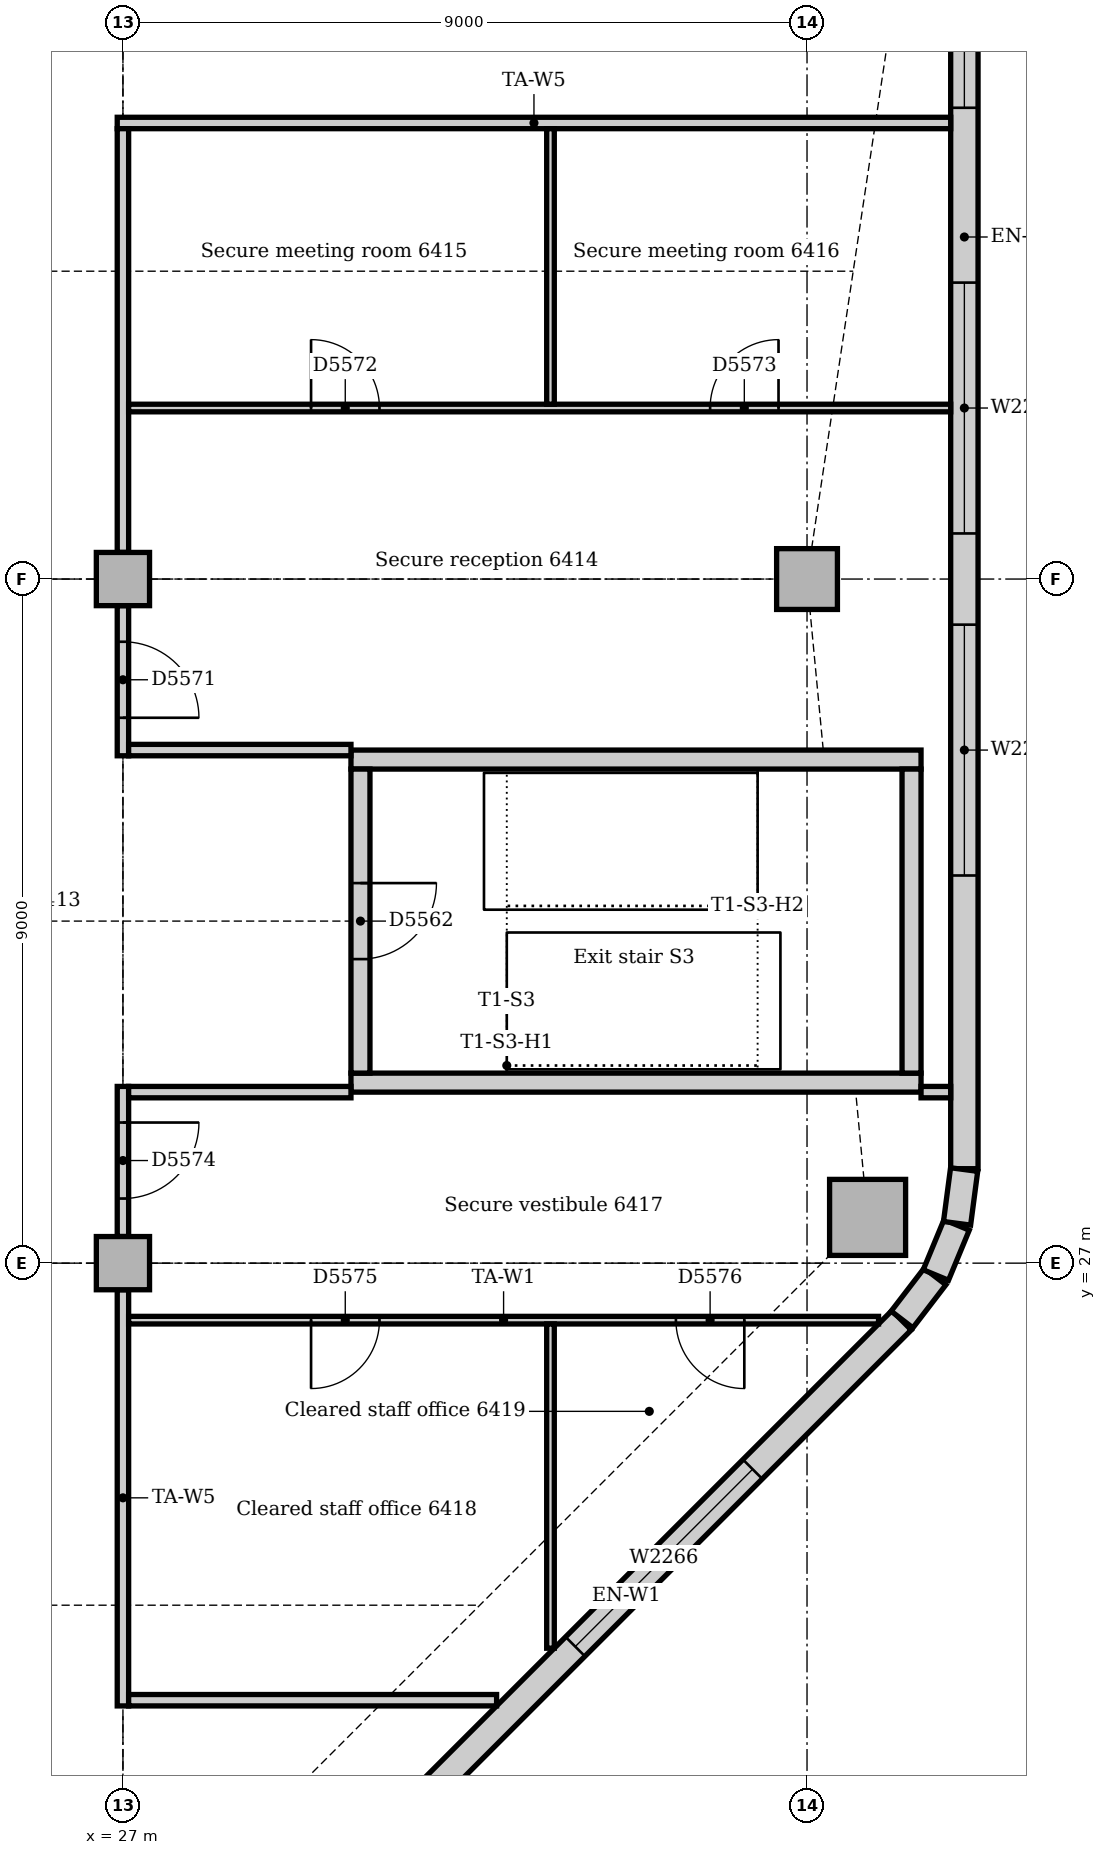
"""IFC4 building model, lengths in metres.
Left out: names, types, materials, properties, quantities, classifications, styles, units other than length and angle.
Written with IfcOpenShell. Run it as: python <this file> out.ifc"""

import sys

from ifc_helpers import new_model, si_unit, direction, frame, frame_2d, origin, origin_2d, place, context, subcontext, project, spatial, rectangle, extrude, element, fill, save


model = new_model("IFC4")
c1 = context("Model", 3, precision=1e-05, world=origin(), true_north=direction((0.0, 1.0)))
c2 = subcontext(c1, "Body", "Model", "MODEL_VIEW")
j1 = project(units=[si_unit("LENGTHUNIT", "METRE"), si_unit("PLANEANGLEUNIT", "RADIAN")], contexts=[c1])
p1 = place(None, origin())
s1 = spatial("IfcSite", under=j1, at=p1, CompositionType="ELEMENT")
p2 = place(p1, origin())
s2 = spatial("IfcBuilding", under=s1, at=p2, CompositionType="ELEMENT")
p3 = place(p2, frame((0.0, 0.0, 267.0)))
s3 = spatial("IfcBuildingStorey", under=s2, at=p3, CompositionType="ELEMENT", Elevation=267.0)
for number, where, z_axis, x_axis in (
    (1, (30.0, 29.375, 0.0), (0.0, 0.0, 1.0), (1.0, 0.0, 0.0)),
    (2, (37.5, 33.625, 0.0), (0.0, 0.0, 1.0), (-1.0, 0.0, 0.0)),
):
    element("IfcWall", number, at=place(p3, frame(where, z_axis=z_axis, x_axis=x_axis)), inside=s3, PredefinedType="SOLIDWALL", context=c2, shape_type="SweptSolid", body=[
        extrude(rectangle(XDim=7.5, YDim=0.25, at=frame_2d((3.75, 0.0))), origin(), (0.0, 0.0, 1.0), 4.0),
    ])
p4 = place(p3, frame((37.375, 29.5, 0.0), z_axis=(0.0, 0.0, 1.0), x_axis=(0.0, 1.0, 0.0)))
e3 = element("IfcWall", 3, at=p4, inside=s3, PredefinedType="SOLIDWALL", context=c2, shape_type="SweptSolid", body=[
    extrude(rectangle(XDim=4.0, YDim=0.25, at=frame_2d((2.0, 0.0))), origin(), (0.0, 0.0, 1.0), 4.0),
])
p5 = place(p3, frame((30.125, 33.5, 0.0), z_axis=(0.0, 0.0, 1.0), x_axis=(0.0, -1.0, 0.0)))
e4 = element("IfcWall", 4, at=p5, inside=s3, PredefinedType="SOLIDWALL", context=c2, shape_type="SweptSolid", body=[
    extrude(rectangle(XDim=4.0, YDim=0.25, at=frame_2d((2.0, 0.0))), origin(), (0.0, 0.0, 1.0), 4.0),
])
p6 = place(p5, frame((1.5, 0.0, 0.0)))
e5 = element("IfcOpeningElement", 5, at=p6, cuts=e4, PredefinedType="OPENING", context=c2, shape_type="SweptSolid", body=[
    extrude(rectangle(XDim=1.0, YDim=2.1, at=frame_2d((0.5, 1.05))), frame((0.0, 0.135, 0.0), z_axis=(0.0, -1.0, 0.0), x_axis=(1.0, 0.0, 0.0)), (0.0, 0.0, 1.0), 0.27),
])
p7 = place(p3, frame((36.797, 27.602, 0.0), z_axis=(0.0, 0.0, 1.0), x_axis=(1.0, 0.0, 0.0)))
e6 = element("IfcColumn", 6, at=p7, inside=s3, PredefinedType="COLUMN", context=c2, shape_type="SweptSolid", body=[
    extrude(rectangle(XDim=1.0, YDim=1.0, at=origin_2d()), origin(), (0.0, 0.0, 1.0), 3.85),
])
p8 = place(p3, frame((36.0, 36.0, 0.0), z_axis=(0.0, 0.0, 1.0), x_axis=(1.0, 0.0, 0.0)))
e7 = element("IfcColumn", 7, at=p8, inside=s3, PredefinedType="COLUMN", context=c2, shape_type="SweptSolid", body=[
    extrude(rectangle(XDim=0.8, YDim=0.8, at=origin_2d()), origin(), (0.0, 0.0, 1.0), 3.85),
])
for number, where, z_axis, x_axis in (
    (8, (27.0, 27.0, 0.0), (0.0, 0.0, 1.0), (1.0, 0.0, 0.0)),
    (9, (27.0, 36.0, 0.0), (0.0, 0.0, 1.0), (1.0, 0.0, 0.0)),
):
    element("IfcColumn", number, at=place(p3, frame(where, z_axis=z_axis, x_axis=x_axis)), inside=s3, PredefinedType="COLUMN", context=c2, shape_type="SweptSolid", body=[
        extrude(rectangle(XDim=0.7, YDim=0.7, at=origin_2d()), origin(), (0.0, 0.0, 1.0), 3.85),
    ])
p9 = place(p3, frame((30.001, 19.006, 0.0), z_axis=(0.0, 0.0, 1.0), x_axis=(0.707106781187, 0.707106781187, 0.0)))
e10 = element("IfcWall", 10, at=p9, inside=s3, PredefinedType="STANDARD", context=c2, shape_type="SweptSolid", body=[
    extrude(rectangle(XDim=10.243, YDim=0.36, at=frame_2d((5.121, 0.0))), origin(), (0.0, 0.0, 1.0), 3.85),
])
p10 = place(p9, frame((4.171, 0.0, 0.9)))
e11 = element("IfcOpeningElement", 11, at=p10, cuts=e10, PredefinedType="OPENING", context=c2, shape_type="SweptSolid", body=[
    extrude(rectangle(XDim=3.3, YDim=1.6, at=frame_2d((1.65, 0.8))), frame((0.0, 0.19, 0.0), z_axis=(0.0, -1.0, 0.0), x_axis=(1.0, 0.0, 0.0)), (0.0, 0.0, 1.0), 0.38),
])
p11 = place(p3, frame((38.07, 28.243, 0.0), z_axis=(0.0, 0.0, 1.0), x_axis=(0.0, 1.0, 0.0)))
e12 = element("IfcWall", 12, at=p11, inside=s3, PredefinedType="STANDARD", context=c2, shape_type="SweptSolid", body=[
    extrude(rectangle(XDim=24.515, YDim=0.36, at=frame_2d((12.257, 0.0))), origin(), (0.0, 0.0, 1.0), 3.85),
])
p12 = place(p11, frame((3.857, 0.0, 0.9)))
e13 = element("IfcOpeningElement", 13, at=p12, cuts=e12, PredefinedType="OPENING", context=c2, shape_type="SweptSolid", body=[
    extrude(rectangle(XDim=3.3, YDim=1.6, at=frame_2d((1.65, 0.8))), frame((0.0, 0.19, 0.0), z_axis=(0.0, -1.0, 0.0), x_axis=(1.0, 0.0, 0.0)), (0.0, 0.0, 1.0), 0.38),
])
p13 = place(p11, frame((8.357, 0.0, 0.9)))
e14 = element("IfcOpeningElement", 14, at=p13, cuts=e12, PredefinedType="OPENING", context=c2, shape_type="SweptSolid", body=[
    extrude(rectangle(XDim=3.3, YDim=1.6, at=frame_2d((1.65, 0.8))), frame((0.0, 0.19, 0.0), z_axis=(0.0, -1.0, 0.0), x_axis=(1.0, 0.0, 0.0)), (0.0, 0.0, 1.0), 0.38),
])
p14 = place(p11, frame((13.957, 0.0, 0.9)))
e15 = element("IfcOpeningElement", 15, at=p14, cuts=e12, PredefinedType="OPENING", context=c2, shape_type="SweptSolid", body=[
    extrude(rectangle(XDim=1.8, YDim=1.6, at=frame_2d((0.9, 0.8))), frame((0.0, 0.19, 0.0), z_axis=(0.0, -1.0, 0.0), x_axis=(1.0, 0.0, 0.0)), (0.0, 0.0, 1.0), 0.38),
])
p15 = place(p11, frame((17.357, 0.0, 0.9)))
e16 = element("IfcOpeningElement", 16, at=p15, cuts=e12, PredefinedType="OPENING", context=c2, shape_type="SweptSolid", body=[
    extrude(rectangle(XDim=3.3, YDim=1.6, at=frame_2d((1.65, 0.8))), frame((0.0, 0.19, 0.0), z_axis=(0.0, -1.0, 0.0), x_axis=(1.0, 0.0, 0.0)), (0.0, 0.0, 1.0), 0.38),
])
p16 = place(p3, frame((37.25, 26.259, 0.0), z_axis=(0.0, 0.0, 1.0), x_axis=(0.608802368033, 0.793321924995, 0.0)))
e17 = element("IfcWall", 17, at=p16, inside=s3, PredefinedType="STANDARD", context=c2, shape_type="SweptSolid", body=[
    extrude(rectangle(XDim=0.713, YDim=0.36, at=frame_2d((0.357, 0.0))), origin(), (0.0, 0.0, 1.0), 3.85),
])
for number, where, z_axis, x_axis in (
    (18, (37.695, 26.844, 0.0), (0.0, 0.0, 1.0), (0.383, 0.924, 0.0)),
    (19, (37.974, 27.524, 0.0), (0.0, 0.0, 1.0), (0.131, 0.991, 0.0)),
):
    element("IfcWall", number, at=place(p3, frame(where, z_axis=z_axis, x_axis=x_axis)), inside=s3, PredefinedType="STANDARD", context=c2, shape_type="SweptSolid", body=[
        extrude(rectangle(XDim=0.713, YDim=0.36, at=frame_2d((0.356, 0.0))), origin(), (0.0, 0.0, 1.0), 3.85),
    ])
p17 = place(p3, frame((26.925, 42.0, 0.0), z_axis=(0.0, 0.0, 1.0), x_axis=(1.0, 0.0, 0.0)))
e20 = element("IfcWall", 20, at=p17, inside=s3, PredefinedType="PARTITIONING", context=c2, shape_type="SweptSolid", body=[
    extrude(rectangle(XDim=10.965, YDim=0.15, at=frame_2d((5.482, 0.0))), origin(), (0.0, 0.0, 1.0), 3.85),
])
p18 = place(p3, frame((27.0, 33.675, 0.0), z_axis=(0.0, 0.0, 1.0), x_axis=(0.0, 1.0, 0.0)))
e21 = element("IfcWall", 21, at=p18, inside=s3, PredefinedType="PARTITIONING", context=c2, shape_type="SweptSolid", body=[
    extrude(rectangle(XDim=1.975, YDim=0.15, at=frame_2d((0.988, 0.0))), origin(), (0.0, 0.0, 1.0), 3.4),
])
p19 = place(p18, frame((0.5, 0.0, 0.0)))
e22 = element("IfcOpeningElement", 22, at=p19, cuts=e21, PredefinedType="OPENING", context=c2, shape_type="SweptSolid", body=[
    extrude(rectangle(XDim=1.0, YDim=2.1, at=frame_2d((0.5, 1.05))), frame((0.0, 0.085, 0.0), z_axis=(0.0, -1.0, 0.0), x_axis=(1.0, 0.0, 0.0)), (0.0, 0.0, 1.0), 0.17),
])
p20 = place(p3, frame((27.0, 36.35, 0.0), z_axis=(0.0, 0.0, 1.0), x_axis=(0.0, 1.0, 0.0)))
e23 = element("IfcWall", 23, at=p20, inside=s3, PredefinedType="PARTITIONING", context=c2, shape_type="SweptSolid", body=[
    extrude(rectangle(XDim=5.575, YDim=0.15, at=frame_2d((2.788, 0.0))), origin(), (0.0, 0.0, 1.0), 3.4),
])
p21 = place(p3, frame((27.0, 21.175, 0.0), z_axis=(0.0, 0.0, 1.0), x_axis=(0.0, 1.0, 0.0)))
e24 = element("IfcWall", 24, at=p21, inside=s3, PredefinedType="PARTITIONING", context=c2, shape_type="SweptSolid", body=[
    extrude(rectangle(XDim=5.475, YDim=0.15, at=frame_2d((2.737, 0.0))), origin(), (0.0, 0.0, 1.0), 3.4),
])
p22 = place(p3, frame((27.0, 27.35, 0.0), z_axis=(0.0, 0.0, 1.0), x_axis=(0.0, 1.0, 0.0)))
e25 = element("IfcWall", 25, at=p22, inside=s3, PredefinedType="PARTITIONING", context=c2, shape_type="SweptSolid", body=[
    extrude(rectangle(XDim=1.975, YDim=0.15, at=frame_2d((0.988, 0.0))), origin(), (0.0, 0.0, 1.0), 3.4),
])
p23 = place(p22, frame((0.5, 0.0, 0.0)))
e26 = element("IfcOpeningElement", 26, at=p23, cuts=e25, PredefinedType="OPENING", context=c2, shape_type="SweptSolid", body=[
    extrude(rectangle(XDim=1.0, YDim=2.1, at=frame_2d((0.5, 1.05))), frame((0.0, 0.085, 0.0), z_axis=(0.0, -1.0, 0.0), x_axis=(1.0, 0.0, 0.0)), (0.0, 0.0, 1.0), 0.17),
])
p24 = place(p3, frame((27.075, 21.25, 0.0), z_axis=(0.0, 0.0, 1.0), x_axis=(1.0, 0.0, 0.0)))
e27 = element("IfcWall", 27, at=p24, inside=s3, PredefinedType="PARTITIONING", context=c2, shape_type="SweptSolid", body=[
    extrude(rectangle(XDim=4.841, YDim=0.15, at=frame_2d((2.421, 0.0))), origin(), (0.0, 0.0, 1.0), 3.85),
])
for number, where, z_axis, x_axis in (
    (28, (27.075, 29.25, 0.0), (0.0, 0.0, 1.0), (1.0, 0.0, 0.0)),
    (29, (27.075, 33.75, 0.0), (0.0, 0.0, 1.0), (1.0, 0.0, 0.0)),
):
    element("IfcWall", number, at=place(p3, frame(where, z_axis=z_axis, x_axis=x_axis)), inside=s3, PredefinedType="PARTITIONING", context=c2, shape_type="SweptSolid", body=[
        extrude(rectangle(XDim=2.925, YDim=0.15, at=frame_2d((1.462, 0.0))), origin(), (0.0, 0.0, 1.0), 3.85),
    ])
p25 = place(p3, frame((37.5, 29.25, 0.0), z_axis=(0.0, 0.0, 1.0), x_axis=(1.0, 0.0, 0.0)))
e30 = element("IfcWall", 30, at=p25, inside=s3, PredefinedType="PARTITIONING", context=c2, shape_type="SweptSolid", body=[
    extrude(rectangle(XDim=0.39, YDim=0.15, at=frame_2d((0.195, 0.0))), origin(), (0.0, 0.0, 1.0), 3.85),
])
p26 = place(p3, frame((27.075, 38.25, 0.0), z_axis=(0.0, 0.0, 1.0), x_axis=(1.0, 0.0, 0.0)))
e31 = element("IfcWall", 31, at=p26, inside=s3, PredefinedType="PARTITIONING", context=c2, shape_type="SweptSolid", body=[
    extrude(rectangle(XDim=10.815, YDim=0.1, at=frame_2d((5.407, 0.0))), origin(), (0.0, 0.0, 1.0), 3.85),
])
p27 = place(p26, frame((2.4, 0.0, 0.0)))
e32 = element("IfcOpeningElement", 32, at=p27, cuts=e31, PredefinedType="OPENING", context=c2, shape_type="SweptSolid", body=[
    extrude(rectangle(XDim=0.9, YDim=2.1, at=frame_2d((0.45, 1.05))), frame((0.0, 0.06, 0.0), z_axis=(0.0, -1.0, 0.0), x_axis=(1.0, 0.0, 0.0)), (0.0, 0.0, 1.0), 0.12),
])
p28 = place(p26, frame((7.65, 0.0, 0.0)))
e33 = element("IfcOpeningElement", 33, at=p28, cuts=e31, PredefinedType="OPENING", context=c2, shape_type="SweptSolid", body=[
    extrude(rectangle(XDim=0.9, YDim=2.1, at=frame_2d((0.45, 1.05))), frame((0.0, 0.06, 0.0), z_axis=(0.0, -1.0, 0.0), x_axis=(1.0, 0.0, 0.0)), (0.0, 0.0, 1.0), 0.12),
])
p29 = place(p3, frame((27.075, 26.25, 0.0), z_axis=(0.0, 0.0, 1.0), x_axis=(1.0, 0.0, 0.0)))
e34 = element("IfcWall", 34, at=p29, inside=s3, PredefinedType="PARTITIONING", context=c2, shape_type="SweptSolid", body=[
    extrude(rectangle(XDim=9.866, YDim=0.1, at=frame_2d((4.933, 0.0))), origin(), (0.0, 0.0, 1.0), 3.85),
])
p30 = place(p29, frame((2.4, 0.0, 0.0)))
e35 = element("IfcOpeningElement", 35, at=p30, cuts=e34, PredefinedType="OPENING", context=c2, shape_type="SweptSolid", body=[
    extrude(rectangle(XDim=0.9, YDim=2.1, at=frame_2d((0.45, 1.05))), frame((0.0, 0.06, 0.0), z_axis=(0.0, -1.0, 0.0), x_axis=(1.0, 0.0, 0.0)), (0.0, 0.0, 1.0), 0.12),
])
p31 = place(p29, frame((7.2, 0.0, 0.0)))
e36 = element("IfcOpeningElement", 36, at=p31, cuts=e34, PredefinedType="OPENING", context=c2, shape_type="SweptSolid", body=[
    extrude(rectangle(XDim=0.9, YDim=2.1, at=frame_2d((0.45, 1.05))), frame((0.0, 0.06, 0.0), z_axis=(0.0, -1.0, 0.0), x_axis=(1.0, 0.0, 0.0)), (0.0, 0.0, 1.0), 0.12),
])
p32 = place(p3, frame((32.625, 21.934, 0.0), z_axis=(0.0, 0.0, 1.0), x_axis=(0.0, 1.0, 0.0)))
e37 = element("IfcWall", 37, at=p32, inside=s3, PredefinedType="PARTITIONING", context=c2, shape_type="SweptSolid", body=[
    extrude(rectangle(XDim=4.266, YDim=0.1, at=frame_2d((2.133, 0.0))), origin(), (0.0, 0.0, 1.0), 3.85),
])
p33 = place(p3, frame((32.625, 38.3, 0.0), z_axis=(0.0, 0.0, 1.0), x_axis=(0.0, 1.0, 0.0)))
e38 = element("IfcWall", 38, at=p33, inside=s3, PredefinedType="PARTITIONING", context=c2, shape_type="SweptSolid", body=[
    extrude(rectangle(XDim=3.625, YDim=0.1, at=frame_2d((1.812, 0.0))), origin(), (0.0, 0.0, 1.0), 3.85),
])
p34 = place(p10, origin())
e39 = element("IfcWindow", 39, at=p34, inside=s3, PartitioningType="SINGLE_PANEL", PredefinedType="WINDOW", context=c2, shape_type="SweptSolid", body=[
    extrude(rectangle(XDim=3.3, YDim=1.6, at=frame_2d((1.65, 0.8))), frame((0.0, 0.13, 0.0), z_axis=(0.0, -1.0, 0.0), x_axis=(1.0, 0.0, 0.0)), (0.0, 0.0, 1.0), 0.06),
])
fill(e11, e39)
p35 = place(p12, origin())
e40 = element("IfcWindow", 40, at=p35, inside=s3, PartitioningType="SINGLE_PANEL", PredefinedType="WINDOW", context=c2, shape_type="SweptSolid", body=[
    extrude(rectangle(XDim=3.3, YDim=1.6, at=frame_2d((1.65, 0.8))), frame((0.0, 0.13, 0.0), z_axis=(0.0, -1.0, 0.0), x_axis=(1.0, 0.0, 0.0)), (0.0, 0.0, 1.0), 0.06),
])
fill(e13, e40)
p36 = place(p13, origin())
e41 = element("IfcWindow", 41, at=p36, inside=s3, PartitioningType="SINGLE_PANEL", PredefinedType="WINDOW", context=c2, shape_type="SweptSolid", body=[
    extrude(rectangle(XDim=3.3, YDim=1.6, at=frame_2d((1.65, 0.8))), frame((0.0, 0.13, 0.0), z_axis=(0.0, -1.0, 0.0), x_axis=(1.0, 0.0, 0.0)), (0.0, 0.0, 1.0), 0.06),
])
fill(e14, e41)
p37 = place(p14, origin())
e42 = element("IfcWindow", 42, at=p37, inside=s3, PartitioningType="SINGLE_PANEL", PredefinedType="WINDOW", context=c2, shape_type="SweptSolid", body=[
    extrude(rectangle(XDim=1.8, YDim=1.6, at=frame_2d((0.9, 0.8))), frame((0.0, 0.13, 0.0), z_axis=(0.0, -1.0, 0.0), x_axis=(1.0, 0.0, 0.0)), (0.0, 0.0, 1.0), 0.06),
])
fill(e15, e42)
p38 = place(p6, origin())
e43 = element("IfcDoor", 43, at=p38, inside=s3, OperationType="SINGLE_SWING_LEFT", PredefinedType="DOOR", context=c2, shape_type="SweptSolid", body=[
    extrude(rectangle(XDim=1.0, YDim=2.1, at=frame_2d((0.5, 1.05))), frame((0.0, 0.025, 0.0), z_axis=(0.0, -1.0, 0.0), x_axis=(1.0, 0.0, 0.0)), (0.0, 0.0, 1.0), 0.05),
])
fill(e5, e43)
p39 = place(p19, frame((1.0, 0.0, 0.0), z_axis=(0.0, 0.0, 1.0), x_axis=(-1.0, 0.0, 0.0)))
e44 = element("IfcDoor", 44, at=p39, inside=s3, OperationType="SINGLE_SWING_RIGHT", PredefinedType="DOOR", context=c2, shape_type="SweptSolid", body=[
    extrude(rectangle(XDim=1.0, YDim=2.1, at=frame_2d((0.5, 1.05))), frame((0.0, 0.025, 0.0), z_axis=(0.0, -1.0, 0.0), x_axis=(1.0, 0.0, 0.0)), (0.0, 0.0, 1.0), 0.05),
])
fill(e22, e44)
p40 = place(p27, origin())
e45 = element("IfcDoor", 45, at=p40, inside=s3, OperationType="SINGLE_SWING_LEFT", PredefinedType="DOOR", context=c2, shape_type="SweptSolid", body=[
    extrude(rectangle(XDim=0.9, YDim=2.1, at=frame_2d((0.45, 1.05))), frame((0.0, 0.025, 0.0), z_axis=(0.0, -1.0, 0.0), x_axis=(1.0, 0.0, 0.0)), (0.0, 0.0, 1.0), 0.05),
])
fill(e32, e45)
p41 = place(p28, origin())
e46 = element("IfcDoor", 46, at=p41, inside=s3, OperationType="SINGLE_SWING_RIGHT", PredefinedType="DOOR", context=c2, shape_type="SweptSolid", body=[
    extrude(rectangle(XDim=0.9, YDim=2.1, at=frame_2d((0.45, 1.05))), frame((0.0, 0.025, 0.0), z_axis=(0.0, -1.0, 0.0), x_axis=(1.0, 0.0, 0.0)), (0.0, 0.0, 1.0), 0.05),
])
fill(e33, e46)
p42 = place(p23, frame((1.0, 0.0, 0.0), z_axis=(0.0, 0.0, 1.0), x_axis=(-1.0, 0.0, 0.0)))
e47 = element("IfcDoor", 47, at=p42, inside=s3, OperationType="SINGLE_SWING_LEFT", PredefinedType="DOOR", context=c2, shape_type="SweptSolid", body=[
    extrude(rectangle(XDim=1.0, YDim=2.1, at=frame_2d((0.5, 1.05))), frame((0.0, 0.025, 0.0), z_axis=(0.0, -1.0, 0.0), x_axis=(1.0, 0.0, 0.0)), (0.0, 0.0, 1.0), 0.05),
])
fill(e26, e47)
p43 = place(p30, frame((0.9, 0.0, 0.0), z_axis=(0.0, 0.0, 1.0), x_axis=(-1.0, 0.0, 0.0)))
e48 = element("IfcDoor", 48, at=p43, inside=s3, OperationType="SINGLE_SWING_RIGHT", PredefinedType="DOOR", context=c2, shape_type="SweptSolid", body=[
    extrude(rectangle(XDim=0.9, YDim=2.1, at=frame_2d((0.45, 1.05))), frame((0.0, 0.025, 0.0), z_axis=(0.0, -1.0, 0.0), x_axis=(1.0, 0.0, 0.0)), (0.0, 0.0, 1.0), 0.05),
])
fill(e35, e48)
p44 = place(p31, frame((0.9, 0.0, 0.0), z_axis=(0.0, 0.0, 1.0), x_axis=(-1.0, 0.0, 0.0)))
e49 = element("IfcDoor", 49, at=p44, inside=s3, OperationType="SINGLE_SWING_LEFT", PredefinedType="DOOR", context=c2, shape_type="SweptSolid", body=[
    extrude(rectangle(XDim=0.9, YDim=2.1, at=frame_2d((0.45, 1.05))), frame((0.0, 0.025, 0.0), z_axis=(0.0, -1.0, 0.0), x_axis=(1.0, 0.0, 0.0)), (0.0, 0.0, 1.0), 0.05),
])
fill(e36, e49)
save(model, sys.argv[1])
